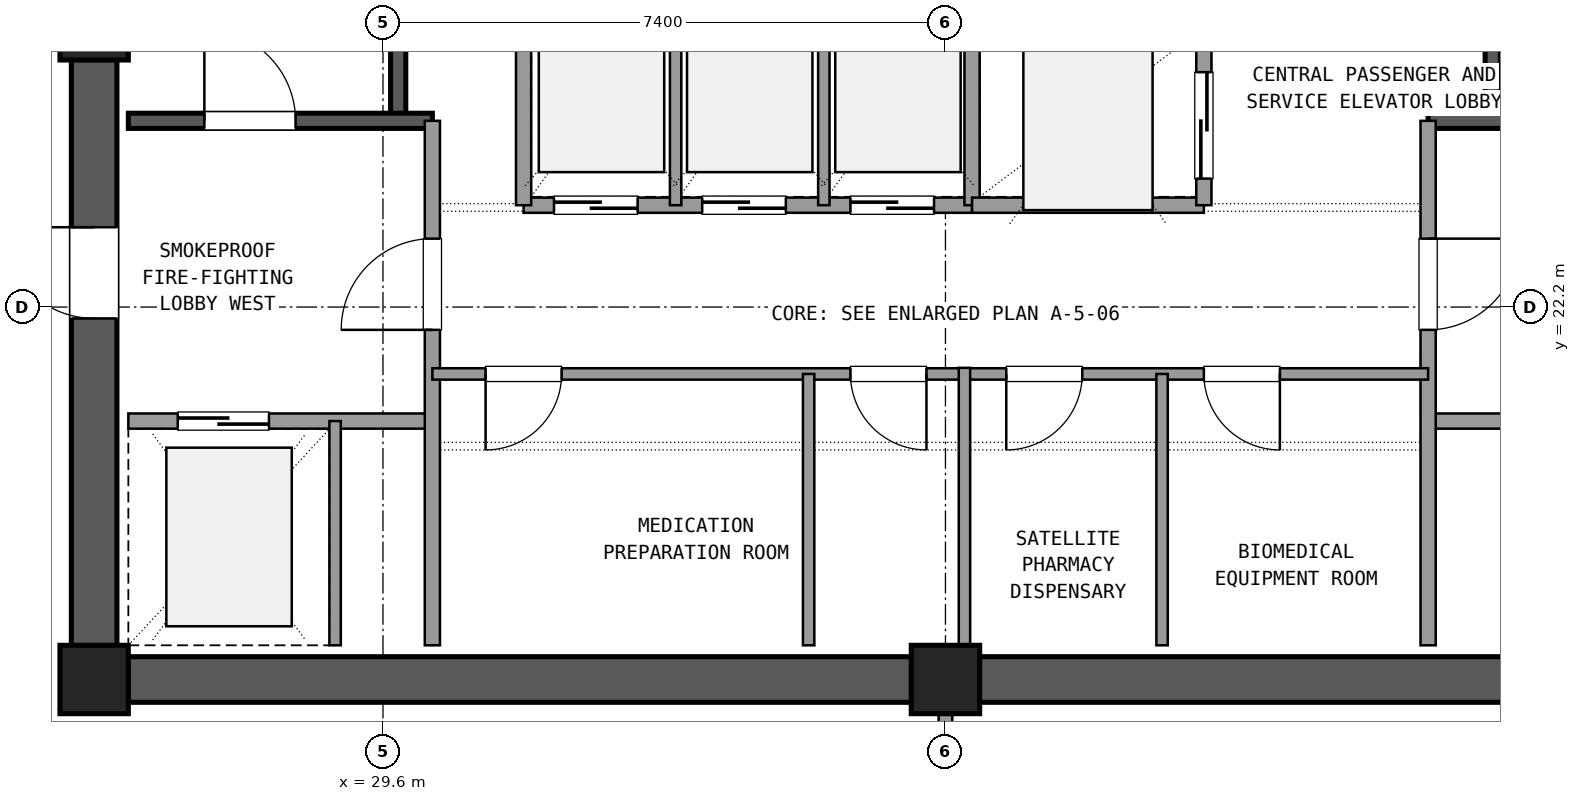
"""IFC4 building model, lengths in metres.
Left out: names, types, materials, properties, quantities, classifications, styles, units other than length and angle.
Written with IfcOpenShell. Run it as: python <this file> out.ifc"""

import sys

from ifc_helpers import new_model, si_unit, direction, frame, frame_2d, origin, origin_2d, place, context, subcontext, project, spatial, rectangle, extrude, element, fill, save


model = new_model("IFC4")
c1 = context("Model", 3, precision=1e-05, world=origin(), true_north=direction((0.0, 1.0)))
c2 = subcontext(c1, "Body", "Model", "MODEL_VIEW")
j1 = project(units=[si_unit("LENGTHUNIT", "METRE"), si_unit("PLANEANGLEUNIT", "RADIAN")], contexts=[c1])
p1 = place(None, origin())
s1 = spatial("IfcSite", under=j1, at=p1, CompositionType="ELEMENT")
p2 = place(p1, origin())
s2 = spatial("IfcBuilding", under=s1, at=p2, CompositionType="ELEMENT")
p3 = place(p2, frame((0.0, 0.0, 192.78)))
s3 = spatial("IfcBuildingStorey", under=s2, at=p3, CompositionType="ELEMENT", Elevation=192.78)
for number, where, z_axis, x_axis in (
    (1, (25.8, 17.3, 0.0), (0.0, 0.0, 1.0), (1.0, 0.0, 0.0)),
    (2, (37.0, 17.3, 0.0), (0.0, 0.0, 1.0), (1.0, 0.0, 0.0)),
    (3, (25.8, 25.9, 0.0), (0.0, 0.0, 1.0), (1.0, 0.0, 0.0)),
):
    element("IfcColumn", number, at=place(p3, frame(where, z_axis=z_axis, x_axis=x_axis)), inside=s3, PredefinedType="COLUMN", context=c2, shape_type="SweptSolid", body=[
        extrude(rectangle(XDim=0.9, YDim=0.9, at=origin_2d()), origin(), (0.0, 0.0, 1.0), 3.6),
    ])
for number, where, z_axis, x_axis in (
    (4, (26.245, 17.3, 0.0), (0.0, 0.0, 1.0), (1.0, 0.0, 0.0)),
    (5, (37.445, 17.3, 0.0), (0.0, 0.0, 1.0), (1.0, 0.0, 0.0)),
):
    element("IfcWall", number, at=place(p3, frame(where, z_axis=z_axis, x_axis=x_axis)), inside=s3, PredefinedType="SHEAR", context=c2, shape_type="SweptSolid", body=[
        extrude(rectangle(XDim=10.31, YDim=0.6, at=frame_2d((5.155, 0.0))), origin(), (0.0, 0.0, 1.0), 3.32),
    ])
p4 = place(p3, frame((25.8, 25.455, 0.0), z_axis=(0.0, 0.0, 1.0), x_axis=(0.0, -1.0, 0.0)))
e6 = element("IfcWall", 6, at=p4, inside=s3, PredefinedType="SHEAR", context=c2, shape_type="SweptSolid", body=[
    extrude(rectangle(XDim=7.71, YDim=0.6, at=frame_2d((3.855, 0.0))), origin(), (0.0, 0.0, 1.0), 3.32),
])
p5 = place(p4, frame((2.205, 0.0, 0.0)))
e7 = element("IfcOpeningElement", 7, at=p5, cuts=e6, PredefinedType="OPENING", context=c2, shape_type="SweptSolid", body=[
    extrude(rectangle(XDim=1.2, YDim=2.15, at=frame_2d((0.6, 1.075))), frame((0.0, 0.31, 0.0), z_axis=(0.0, -1.0, 0.0), x_axis=(1.0, 0.0, 0.0)), (0.0, 0.0, 1.0), 0.62),
])
p6 = place(p3, frame((29.8, 24.65, 0.0), z_axis=(0.0, 0.0, 1.0), x_axis=(0.0, 1.0, 0.0)))
e8 = element("IfcWall", 8, at=p6, inside=s3, PredefinedType="SHEAR", context=c2, shape_type="SweptSolid", body=[
    extrude(rectangle(XDim=9.4, YDim=0.2, at=frame_2d((4.7, 0.0))), origin(), (0.0, 0.0, 1.0), 3.32),
])
p7 = place(p3, frame((26.25, 24.65, 0.0), z_axis=(0.0, 0.0, 1.0), x_axis=(1.0, 0.0, 0.0)))
e9 = element("IfcWall", 9, at=p7, inside=s3, PredefinedType="SHEAR", context=c2, shape_type="SweptSolid", body=[
    extrude(rectangle(XDim=4.0, YDim=0.2, at=frame_2d((2.0, 0.0))), origin(), (0.0, 0.0, 1.0), 3.32),
])
p8 = place(p7, frame((1.0, 0.0, 0.0)))
e10 = element("IfcOpeningElement", 10, at=p8, cuts=e9, PredefinedType="OPENING", context=c2, shape_type="SweptSolid", body=[
    extrude(rectangle(XDim=1.2, YDim=2.15, at=frame_2d((0.6, 1.075))), frame((0.0, 0.11, 0.0), z_axis=(0.0, -1.0, 0.0), x_axis=(1.0, 0.0, 0.0)), (0.0, 0.0, 1.0), 0.22),
])
p9 = place(p3, frame((44.2, 24.65, 0.0), z_axis=(0.0, 0.0, 1.0), x_axis=(0.0, 1.0, 0.0)))
e11 = element("IfcWall", 11, at=p9, inside=s3, PredefinedType="SHEAR", context=c2, shape_type="SweptSolid", body=[
    extrude(rectangle(XDim=9.4, YDim=0.2, at=frame_2d((4.7, 0.0))), origin(), (0.0, 0.0, 1.0), 3.32),
])
p10 = place(p3, frame((43.35, 24.65, 0.0), z_axis=(0.0, 0.0, 1.0), x_axis=(1.0, 0.0, 0.0)))
e12 = element("IfcWall", 12, at=p10, inside=s3, PredefinedType="SHEAR", context=c2, shape_type="SweptSolid", body=[
    extrude(rectangle(XDim=4.4, YDim=0.2, at=frame_2d((2.2, 0.0))), origin(), (0.0, 0.0, 1.0), 3.32),
])
p11 = place(p10, frame((2.0, 0.0, 0.0)))
e13 = element("IfcOpeningElement", 13, at=p11, cuts=e12, PredefinedType="OPENING", context=c2, shape_type="SweptSolid", body=[
    extrude(rectangle(XDim=1.2, YDim=2.15, at=frame_2d((0.6, 1.075))), frame((0.0, 0.11, 0.0), z_axis=(0.0, -1.0, 0.0), x_axis=(1.0, 0.0, 0.0)), (0.0, 0.0, 1.0), 0.22),
])
p12 = place(p3, frame((26.25, 20.7, 0.0), z_axis=(0.0, 0.0, 1.0), x_axis=(1.0, 0.0, 0.0)))
e14 = element("IfcWall", 14, at=p12, inside=s3, PredefinedType="SOLIDWALL", context=c2, shape_type="SweptSolid", body=[
    extrude(rectangle(XDim=4.0, YDim=0.2, at=frame_2d((2.0, 0.0))), origin(), (0.0, 0.0, 1.0), 2.61),
])
p13 = place(p12, frame((0.65, 0.0, 0.0)))
e15 = element("IfcOpeningElement", 15, at=p13, cuts=e14, PredefinedType="OPENING", context=c2, shape_type="SweptSolid", body=[
    extrude(rectangle(XDim=1.2, YDim=2.15, at=frame_2d((0.6, 1.075))), frame((0.0, 0.11, 0.0), z_axis=(0.0, -1.0, 0.0), x_axis=(1.0, 0.0, 0.0)), (0.0, 0.0, 1.0), 0.22),
])
p14 = place(p3, frame((30.25, 17.75, 0.0), z_axis=(0.0, 0.0, 1.0), x_axis=(0.0, 1.0, 0.0)))
e16 = element("IfcWall", 16, at=p14, inside=s3, PredefinedType="SOLIDWALL", context=c2, shape_type="SweptSolid", body=[
    extrude(rectangle(XDim=6.9, YDim=0.2, at=frame_2d((3.45, 0.0))), origin(), (0.0, 0.0, 1.0), 2.61),
])
p15 = place(p14, frame((4.15, 0.0, 0.0)))
e17 = element("IfcOpeningElement", 17, at=p15, cuts=e16, PredefinedType="OPENING", context=c2, shape_type="SweptSolid", body=[
    extrude(rectangle(XDim=1.2, YDim=2.15, at=frame_2d((0.6, 1.075))), frame((0.0, 0.11, 0.0), z_axis=(0.0, -1.0, 0.0), x_axis=(1.0, 0.0, 0.0)), (0.0, 0.0, 1.0), 0.22),
])
p16 = place(p3, frame((28.97, 17.75, 0.0), z_axis=(0.0, 0.0, 1.0), x_axis=(0.0, 1.0, 0.0)))
e18 = element("IfcWall", 18, at=p16, inside=s3, PredefinedType="PARTITIONING", context=c2, shape_type="SweptSolid", body=[
    extrude(rectangle(XDim=2.95, YDim=0.15, at=frame_2d((1.475, 0.0))), origin(), (0.0, 0.0, 1.0), 2.61),
])
p17 = place(p3, frame((43.35, 20.7, 0.0), z_axis=(0.0, 0.0, 1.0), x_axis=(1.0, 0.0, 0.0)))
e19 = element("IfcWall", 19, at=p17, inside=s3, PredefinedType="SOLIDWALL", context=c2, shape_type="SweptSolid", body=[
    extrude(rectangle(XDim=4.4, YDim=0.2, at=frame_2d((2.2, 0.0))), origin(), (0.0, 0.0, 1.0), 2.61),
])
p18 = place(p17, frame((2.35, 0.0, 0.0)))
e20 = element("IfcOpeningElement", 20, at=p18, cuts=e19, PredefinedType="OPENING", context=c2, shape_type="SweptSolid", body=[
    extrude(rectangle(XDim=1.2, YDim=2.15, at=frame_2d((0.6, 1.075))), frame((0.0, 0.11, 0.0), z_axis=(0.0, -1.0, 0.0), x_axis=(1.0, 0.0, 0.0)), (0.0, 0.0, 1.0), 0.22),
])
p19 = place(p3, frame((43.35, 17.75, 0.0), z_axis=(0.0, 0.0, 1.0), x_axis=(0.0, 1.0, 0.0)))
e21 = element("IfcWall", 21, at=p19, inside=s3, PredefinedType="SOLIDWALL", context=c2, shape_type="SweptSolid", body=[
    extrude(rectangle(XDim=6.9, YDim=0.2, at=frame_2d((3.45, 0.0))), origin(), (0.0, 0.0, 1.0), 2.61),
])
p20 = place(p19, frame((4.15, 0.0, 0.0)))
e22 = element("IfcOpeningElement", 22, at=p20, cuts=e21, PredefinedType="OPENING", context=c2, shape_type="SweptSolid", body=[
    extrude(rectangle(XDim=1.2, YDim=2.15, at=frame_2d((0.6, 1.075))), frame((0.0, 0.11, 0.0), z_axis=(0.0, -1.0, 0.0), x_axis=(1.0, 0.0, 0.0)), (0.0, 0.0, 1.0), 0.22),
])
p21 = place(p3, frame((30.25, 21.32, 0.0), z_axis=(0.0, 0.0, 1.0), x_axis=(1.0, 0.0, 0.0)))
e23 = element("IfcWall", 23, at=p21, inside=s3, PredefinedType="PARTITIONING", context=c2, shape_type="SweptSolid", body=[
    extrude(rectangle(XDim=7.0, YDim=0.15, at=frame_2d((3.5, 0.0))), origin(), (0.0, 0.0, 1.0), 2.61),
])
p22 = place(p21, frame((0.7, 0.0, 0.0)))
e24 = element("IfcOpeningElement", 24, at=p22, cuts=e23, PredefinedType="OPENING", context=c2, shape_type="SweptSolid", body=[
    extrude(rectangle(XDim=1.0, YDim=2.15, at=frame_2d((0.5, 1.075))), frame((0.0, 0.085, 0.0), z_axis=(0.0, -1.0, 0.0), x_axis=(1.0, 0.0, 0.0)), (0.0, 0.0, 1.0), 0.17),
])
p23 = place(p21, frame((5.5, 0.0, 0.0)))
e25 = element("IfcOpeningElement", 25, at=p23, cuts=e23, PredefinedType="OPENING", context=c2, shape_type="SweptSolid", body=[
    extrude(rectangle(XDim=1.0, YDim=2.15, at=frame_2d((0.5, 1.075))), frame((0.0, 0.085, 0.0), z_axis=(0.0, -1.0, 0.0), x_axis=(1.0, 0.0, 0.0)), (0.0, 0.0, 1.0), 0.17),
])
p24 = place(p3, frame((35.2, 17.75, 0.0), z_axis=(0.0, 0.0, 1.0), x_axis=(0.0, 1.0, 0.0)))
e26 = element("IfcWall", 26, at=p24, inside=s3, PredefinedType="PARTITIONING", context=c2, shape_type="SweptSolid", body=[
    extrude(rectangle(XDim=3.57, YDim=0.15, at=frame_2d((1.785, 0.0))), origin(), (0.0, 0.0, 1.0), 2.61),
])
p25 = place(p3, frame((37.25, 21.32, 0.0), z_axis=(0.0, 0.0, 1.0), x_axis=(1.0, 0.0, 0.0)))
e27 = element("IfcWall", 27, at=p25, inside=s3, PredefinedType="PARTITIONING", context=c2, shape_type="SweptSolid", body=[
    extrude(rectangle(XDim=6.1, YDim=0.15, at=frame_2d((3.05, 0.0))), origin(), (0.0, 0.0, 1.0), 2.61),
])
p26 = place(p25, frame((0.55, 0.0, 0.0)))
e28 = element("IfcOpeningElement", 28, at=p26, cuts=e27, PredefinedType="OPENING", context=c2, shape_type="SweptSolid", body=[
    extrude(rectangle(XDim=1.0, YDim=2.15, at=frame_2d((0.5, 1.075))), frame((0.0, 0.085, 0.0), z_axis=(0.0, -1.0, 0.0), x_axis=(1.0, 0.0, 0.0)), (0.0, 0.0, 1.0), 0.17),
])
p27 = place(p25, frame((3.15, 0.0, 0.0)))
e29 = element("IfcOpeningElement", 29, at=p27, cuts=e27, PredefinedType="OPENING", context=c2, shape_type="SweptSolid", body=[
    extrude(rectangle(XDim=1.0, YDim=2.15, at=frame_2d((0.5, 1.075))), frame((0.0, 0.085, 0.0), z_axis=(0.0, -1.0, 0.0), x_axis=(1.0, 0.0, 0.0)), (0.0, 0.0, 1.0), 0.17),
])
p28 = place(p3, frame((39.85, 17.75, 0.0), z_axis=(0.0, 0.0, 1.0), x_axis=(0.0, 1.0, 0.0)))
e30 = element("IfcWall", 30, at=p28, inside=s3, PredefinedType="PARTITIONING", context=c2, shape_type="SweptSolid", body=[
    extrude(rectangle(XDim=3.57, YDim=0.15, at=frame_2d((1.785, 0.0))), origin(), (0.0, 0.0, 1.0), 2.61),
])
p29 = place(p3, frame((37.25, 17.75, 0.0), z_axis=(0.0, 0.0, 1.0), x_axis=(0.0, 1.0, 0.0)))
e31 = element("IfcWall", 31, at=p29, inside=s3, PredefinedType="PARTITIONING", context=c2, shape_type="SweptSolid", body=[
    extrude(rectangle(XDim=3.65, YDim=0.15, at=frame_2d((1.825, 0.0))), origin(), (0.0, 0.0, 1.0), 2.61),
])
p30 = place(p3, frame((31.45, 23.54, 0.0), z_axis=(0.0, 0.0, 1.0), x_axis=(1.0, 0.0, 0.0)))
e32 = element("IfcWall", 32, at=p30, inside=s3, PredefinedType="SOLIDWALL", context=c2, shape_type="SweptSolid", body=[
    extrude(rectangle(XDim=5.9, YDim=0.2, at=frame_2d((2.95, 0.0))), origin(), (0.0, 0.0, 1.0), 2.61),
])
p31 = place(p30, frame((0.4, 0.0, 0.0)))
e33 = element("IfcOpeningElement", 33, at=p31, cuts=e32, PredefinedType="OPENING", context=c2, shape_type="SweptSolid", body=[
    extrude(rectangle(XDim=1.1, YDim=2.15, at=frame_2d((0.55, 1.075))), frame((0.0, 0.11, 0.0), z_axis=(0.0, -1.0, 0.0), x_axis=(1.0, 0.0, 0.0)), (0.0, 0.0, 1.0), 0.22),
])
p32 = place(p30, frame((2.35, 0.0, 0.0)))
e34 = element("IfcOpeningElement", 34, at=p32, cuts=e32, PredefinedType="OPENING", context=c2, shape_type="SweptSolid", body=[
    extrude(rectangle(XDim=1.1, YDim=2.15, at=frame_2d((0.55, 1.075))), frame((0.0, 0.11, 0.0), z_axis=(0.0, -1.0, 0.0), x_axis=(1.0, 0.0, 0.0)), (0.0, 0.0, 1.0), 0.22),
])
p33 = place(p30, frame((4.3, 0.0, 0.0)))
e35 = element("IfcOpeningElement", 35, at=p33, cuts=e32, PredefinedType="OPENING", context=c2, shape_type="SweptSolid", body=[
    extrude(rectangle(XDim=1.1, YDim=2.15, at=frame_2d((0.55, 1.075))), frame((0.0, 0.11, 0.0), z_axis=(0.0, -1.0, 0.0), x_axis=(1.0, 0.0, 0.0)), (0.0, 0.0, 1.0), 0.22),
])
p34 = place(p3, frame((31.45, 23.54, 0.0), z_axis=(0.0, 0.0, 1.0), x_axis=(0.0, 1.0, 0.0)))
e36 = element("IfcWall", 36, at=p34, inside=s3, PredefinedType="SOLIDWALL", context=c2, shape_type="SweptSolid", body=[
    extrude(rectangle(XDim=2.81, YDim=0.2, at=frame_2d((1.405, 0.0))), origin(), (0.0, 0.0, 1.0), 2.61),
])
for number, where, z_axis, x_axis in (
    (37, (33.45, 23.54, 0.0), (0.0, 0.0, 1.0), (0.0, 1.0, 0.0)),
    (38, (35.4, 23.54, 0.0), (0.0, 0.0, 1.0), (0.0, 1.0, 0.0)),
):
    element("IfcWall", number, at=place(p3, frame(where, z_axis=z_axis, x_axis=x_axis)), inside=s3, PredefinedType="PARTITIONING", context=c2, shape_type="SweptSolid", body=[
        extrude(rectangle(XDim=2.81, YDim=0.15, at=frame_2d((1.405, 0.0))), origin(), (0.0, 0.0, 1.0), 2.61),
    ])
p35 = place(p3, frame((37.35, 23.54, 0.0), z_axis=(0.0, 0.0, 1.0), x_axis=(0.0, 1.0, 0.0)))
e39 = element("IfcWall", 39, at=p35, inside=s3, PredefinedType="SOLIDWALL", context=c2, shape_type="SweptSolid", body=[
    extrude(rectangle(XDim=6.82, YDim=0.2, at=frame_2d((3.41, 0.0))), origin(), (0.0, 0.0, 1.0), 2.61),
])
p36 = place(p3, frame((37.35, 23.54, 0.0), z_axis=(0.0, 0.0, 1.0), x_axis=(1.0, 0.0, 0.0)))
e40 = element("IfcWall", 40, at=p36, inside=s3, PredefinedType="SOLIDWALL", context=c2, shape_type="SweptSolid", body=[
    extrude(rectangle(XDim=3.05, YDim=0.2, at=frame_2d((1.525, 0.0))), origin(), (0.0, 0.0, 1.0), 2.61),
])
p37 = place(p3, frame((40.4, 23.54, 0.0), z_axis=(0.0, 0.0, 1.0), x_axis=(0.0, 1.0, 0.0)))
e41 = element("IfcWall", 41, at=p37, inside=s3, PredefinedType="SOLIDWALL", context=c2, shape_type="SweptSolid", body=[
    extrude(rectangle(XDim=6.82, YDim=0.2, at=frame_2d((3.41, 0.0))), origin(), (0.0, 0.0, 1.0), 2.61),
])
p38 = place(p37, frame((0.35, 0.0, 0.0)))
e42 = element("IfcOpeningElement", 42, at=p38, cuts=e41, PredefinedType="OPENING", context=c2, shape_type="SweptSolid", body=[
    extrude(rectangle(XDim=1.4, YDim=2.2, at=frame_2d((0.7, 1.1))), frame((0.0, 0.11, 0.0), z_axis=(0.0, -1.0, 0.0), x_axis=(1.0, 0.0, 0.0)), (0.0, 0.0, 1.0), 0.22),
])
p39 = place(p37, frame((2.65, 0.0, 0.0)))
e43 = element("IfcOpeningElement", 43, at=p39, cuts=e41, PredefinedType="OPENING", context=c2, shape_type="SweptSolid", body=[
    extrude(rectangle(XDim=1.4, YDim=2.2, at=frame_2d((0.7, 1.1))), frame((0.0, 0.11, 0.0), z_axis=(0.0, -1.0, 0.0), x_axis=(1.0, 0.0, 0.0)), (0.0, 0.0, 1.0), 0.22),
])
p40 = place(p37, frame((4.85, 0.0, 0.0)))
e44 = element("IfcOpeningElement", 44, at=p40, cuts=e41, PredefinedType="OPENING", context=c2, shape_type="SweptSolid", body=[
    extrude(rectangle(XDim=1.4, YDim=2.2, at=frame_2d((0.7, 1.1))), frame((0.0, 0.11, 0.0), z_axis=(0.0, -1.0, 0.0), x_axis=(1.0, 0.0, 0.0)), (0.0, 0.0, 1.0), 0.22),
])
p41 = place(p3, frame((37.0, 14.15, 0.0), z_axis=(0.0, 0.0, 1.0), x_axis=(0.0, 1.0, 0.0)))
e45 = element("IfcWall", 45, at=p41, inside=s3, PredefinedType="PARTITIONING", context=c2, shape_type="SweptSolid", body=[
    extrude(rectangle(XDim=2.7, YDim=0.18, at=frame_2d((1.35, 0.0))), origin(), (0.0, 0.0, 1.0), 2.61),
])
p42 = place(p41, frame((0.35, 0.0, 0.0)))
e46 = element("IfcOpeningElement", 46, at=p42, cuts=e45, PredefinedType="OPENING", context=c2, shape_type="SweptSolid", body=[
    extrude(rectangle(XDim=2.0, YDim=2.2, at=frame_2d((1.0, 1.1))), frame((0.0, 0.1, 0.0), z_axis=(0.0, -1.0, 0.0), x_axis=(1.0, 0.0, 0.0)), (0.0, 0.0, 1.0), 0.2),
])
p43 = place(p8, origin())
e47 = element("IfcDoor", 47, at=p43, inside=s3, OperationType="SINGLE_SWING_LEFT", PredefinedType="DOOR", context=c2, shape_type="SweptSolid", body=[
    extrude(rectangle(XDim=1.2, YDim=2.15, at=frame_2d((0.6, 1.075))), frame((0.0, 0.025, 0.0), z_axis=(0.0, -1.0, 0.0), x_axis=(1.0, 0.0, 0.0)), (0.0, 0.0, 1.0), 0.05),
])
fill(e10, e47)
p44 = place(p13, origin())
e48 = element("IfcDoor", 48, at=p44, inside=s3, OperationType="SLIDING_TO_LEFT", PredefinedType="DOOR", context=c2, shape_type="SweptSolid", body=[
    extrude(rectangle(XDim=1.2, YDim=2.15, at=frame_2d((0.6, 1.075))), frame((0.0, 0.025, 0.0), z_axis=(0.0, -1.0, 0.0), x_axis=(1.0, 0.0, 0.0)), (0.0, 0.0, 1.0), 0.05),
])
fill(e15, e48)
p45 = place(p15, origin())
e49 = element("IfcDoor", 49, at=p45, inside=s3, OperationType="SINGLE_SWING_LEFT", PredefinedType="DOOR", context=c2, shape_type="SweptSolid", body=[
    extrude(rectangle(XDim=1.2, YDim=2.15, at=frame_2d((0.6, 1.075))), frame((0.0, 0.025, 0.0), z_axis=(0.0, -1.0, 0.0), x_axis=(1.0, 0.0, 0.0)), (0.0, 0.0, 1.0), 0.05),
])
fill(e17, e49)
p46 = place(p20, frame((1.2, 0.0, 0.0), z_axis=(0.0, 0.0, 1.0), x_axis=(-1.0, 0.0, 0.0)))
e50 = element("IfcDoor", 50, at=p46, inside=s3, OperationType="SINGLE_SWING_RIGHT", PredefinedType="DOOR", context=c2, shape_type="SweptSolid", body=[
    extrude(rectangle(XDim=1.2, YDim=2.15, at=frame_2d((0.6, 1.075))), frame((0.0, 0.025, 0.0), z_axis=(0.0, -1.0, 0.0), x_axis=(1.0, 0.0, 0.0)), (0.0, 0.0, 1.0), 0.05),
])
fill(e22, e50)
p47 = place(p5, frame((1.2, 0.0, 0.0), z_axis=(0.0, 0.0, 1.0), x_axis=(-1.0, 0.0, 0.0)))
e51 = element("IfcDoor", 51, at=p47, inside=s3, OperationType="SINGLE_SWING_LEFT", PredefinedType="DOOR", context=c2, shape_type="SweptSolid", body=[
    extrude(rectangle(XDim=1.2, YDim=2.15, at=frame_2d((0.6, 1.075))), frame((0.0, 0.025, 0.0), z_axis=(0.0, -1.0, 0.0), x_axis=(1.0, 0.0, 0.0)), (0.0, 0.0, 1.0), 0.05),
])
fill(e7, e51)
p48 = place(p22, frame((1.0, 0.0, 0.0), z_axis=(0.0, 0.0, 1.0), x_axis=(-1.0, 0.0, 0.0)))
e52 = element("IfcDoor", 52, at=p48, inside=s3, OperationType="SINGLE_SWING_LEFT", PredefinedType="DOOR", context=c2, shape_type="SweptSolid", body=[
    extrude(rectangle(XDim=1.0, YDim=2.15, at=frame_2d((0.5, 1.075))), frame((0.0, 0.025, 0.0), z_axis=(0.0, -1.0, 0.0), x_axis=(1.0, 0.0, 0.0)), (0.0, 0.0, 1.0), 0.05),
])
fill(e24, e52)
p49 = place(p23, frame((1.0, 0.0, 0.0), z_axis=(0.0, 0.0, 1.0), x_axis=(-1.0, 0.0, 0.0)))
e53 = element("IfcDoor", 53, at=p49, inside=s3, OperationType="SINGLE_SWING_RIGHT", PredefinedType="DOOR", context=c2, shape_type="SweptSolid", body=[
    extrude(rectangle(XDim=1.0, YDim=2.15, at=frame_2d((0.5, 1.075))), frame((0.0, 0.025, 0.0), z_axis=(0.0, -1.0, 0.0), x_axis=(1.0, 0.0, 0.0)), (0.0, 0.0, 1.0), 0.05),
])
fill(e25, e53)
p50 = place(p26, frame((1.0, 0.0, 0.0), z_axis=(0.0, 0.0, 1.0), x_axis=(-1.0, 0.0, 0.0)))
e54 = element("IfcDoor", 54, at=p50, inside=s3, OperationType="SINGLE_SWING_LEFT", PredefinedType="DOOR", context=c2, shape_type="SweptSolid", body=[
    extrude(rectangle(XDim=1.0, YDim=2.15, at=frame_2d((0.5, 1.075))), frame((0.0, 0.025, 0.0), z_axis=(0.0, -1.0, 0.0), x_axis=(1.0, 0.0, 0.0)), (0.0, 0.0, 1.0), 0.05),
])
fill(e28, e54)
p51 = place(p27, frame((1.0, 0.0, 0.0), z_axis=(0.0, 0.0, 1.0), x_axis=(-1.0, 0.0, 0.0)))
e55 = element("IfcDoor", 55, at=p51, inside=s3, OperationType="SINGLE_SWING_RIGHT", PredefinedType="DOOR", context=c2, shape_type="SweptSolid", body=[
    extrude(rectangle(XDim=1.0, YDim=2.15, at=frame_2d((0.5, 1.075))), frame((0.0, 0.025, 0.0), z_axis=(0.0, -1.0, 0.0), x_axis=(1.0, 0.0, 0.0)), (0.0, 0.0, 1.0), 0.05),
])
fill(e29, e55)
p52 = place(p31, origin())
e56 = element("IfcDoor", 56, at=p52, inside=s3, OperationType="SLIDING_TO_RIGHT", PredefinedType="DOOR", context=c2, shape_type="SweptSolid", body=[
    extrude(rectangle(XDim=1.1, YDim=2.15, at=frame_2d((0.55, 1.075))), frame((0.0, 0.025, 0.0), z_axis=(0.0, -1.0, 0.0), x_axis=(1.0, 0.0, 0.0)), (0.0, 0.0, 1.0), 0.05),
])
fill(e33, e56)
p53 = place(p32, origin())
e57 = element("IfcDoor", 57, at=p53, inside=s3, OperationType="SLIDING_TO_RIGHT", PredefinedType="DOOR", context=c2, shape_type="SweptSolid", body=[
    extrude(rectangle(XDim=1.1, YDim=2.15, at=frame_2d((0.55, 1.075))), frame((0.0, 0.025, 0.0), z_axis=(0.0, -1.0, 0.0), x_axis=(1.0, 0.0, 0.0)), (0.0, 0.0, 1.0), 0.05),
])
fill(e34, e57)
p54 = place(p33, origin())
e58 = element("IfcDoor", 58, at=p54, inside=s3, OperationType="SLIDING_TO_RIGHT", PredefinedType="DOOR", context=c2, shape_type="SweptSolid", body=[
    extrude(rectangle(XDim=1.1, YDim=2.15, at=frame_2d((0.55, 1.075))), frame((0.0, 0.025, 0.0), z_axis=(0.0, -1.0, 0.0), x_axis=(1.0, 0.0, 0.0)), (0.0, 0.0, 1.0), 0.05),
])
fill(e35, e58)
p55 = place(p38, origin())
e59 = element("IfcDoor", 59, at=p55, inside=s3, OperationType="SLIDING_TO_LEFT", PredefinedType="DOOR", context=c2, shape_type="SweptSolid", body=[
    extrude(rectangle(XDim=1.4, YDim=2.2, at=frame_2d((0.7, 1.1))), frame((0.0, 0.025, 0.0), z_axis=(0.0, -1.0, 0.0), x_axis=(1.0, 0.0, 0.0)), (0.0, 0.0, 1.0), 0.05),
])
fill(e42, e59)
save(model, sys.argv[1])
